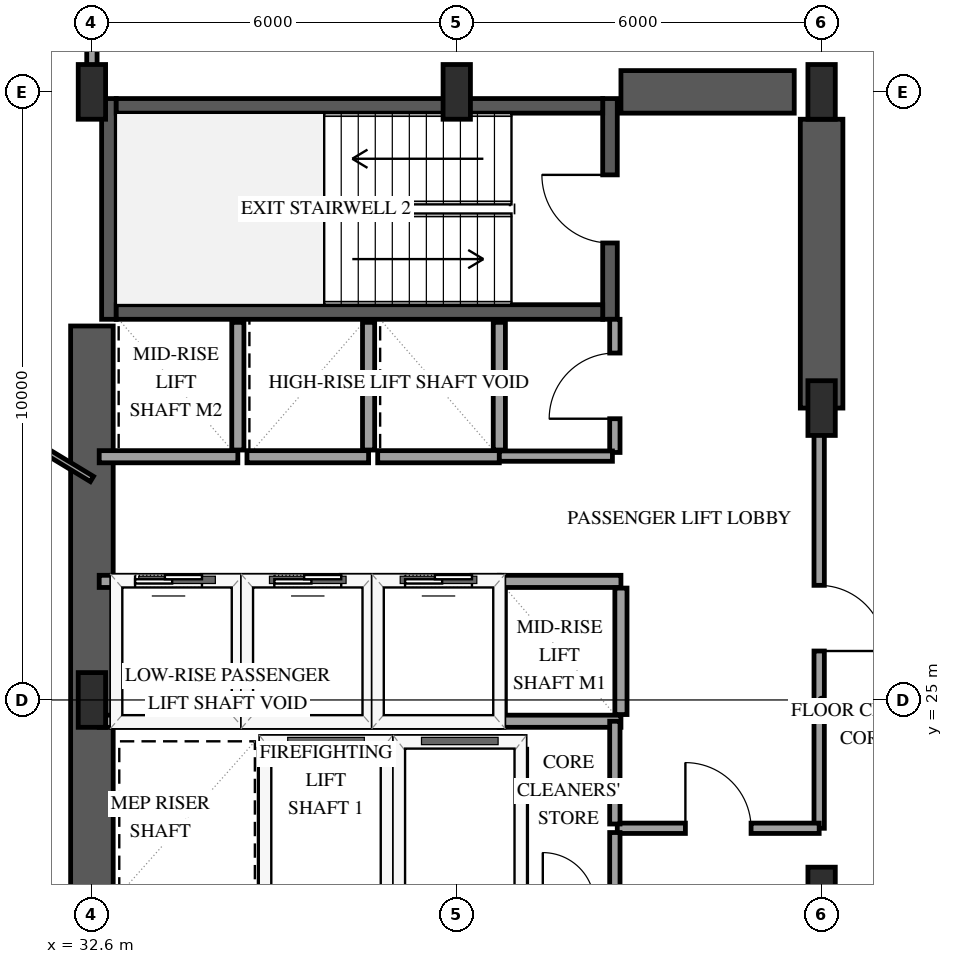
"""IFC4 building model, lengths in metres.
Left out: names, types, materials, properties, quantities, classifications, styles, units other than length and angle.
Written with IfcOpenShell. Run it as: python <this file> out.ifc"""

import sys

from ifc_helpers import new_model, si_unit, direction, frame, frame_2d, origin, origin_2d, place, context, subcontext, project, spatial, rectangle, extrude, element, fill, save


model = new_model("IFC4")
c1 = context("Model", 3, precision=1e-05, world=origin(), true_north=direction((0.0, 1.0)))
c2 = subcontext(c1, "Body", "Model", "MODEL_VIEW")
j1 = project(units=[si_unit("LENGTHUNIT", "METRE"), si_unit("PLANEANGLEUNIT", "RADIAN")], contexts=[c1])
p1 = place(None, origin())
s1 = spatial("IfcSite", under=j1, at=p1, CompositionType="ELEMENT")
p2 = place(p1, origin())
s2 = spatial("IfcBuilding", under=s1, at=p2, CompositionType="ELEMENT")
p3 = place(p2, frame((0.0, 0.0, 34.6)))
s3 = spatial("IfcBuildingStorey", under=s2, at=p3, CompositionType="ELEMENT", Elevation=34.6)
p4 = place(p3, frame((32.88, 31.26, 0.0), z_axis=(0.0, 0.0, 1.0), x_axis=(0.0, 1.0, 0.0)))
e1 = element("IfcWall", 1, at=p4, inside=s3, PredefinedType="SHEAR", context=c2, shape_type="SweptSolid", body=[
    extrude(rectangle(XDim=3.63, YDim=0.24, at=frame_2d((1.815, 0.0))), origin(), (0.0, 0.0, 1.0), 4.0),
])
p5 = place(p3, frame((41.12, 31.26, 0.0), z_axis=(0.0, 0.0, 1.0), x_axis=(0.0, 1.0, 0.0)))
e2 = element("IfcWall", 2, at=p5, inside=s3, PredefinedType="SHEAR", context=c2, shape_type="SweptSolid", body=[
    extrude(rectangle(XDim=3.63, YDim=0.24, at=frame_2d((1.815, 0.0))), origin(), (0.0, 0.0, 1.0), 4.0),
])
p6 = place(p5, frame((1.255, 0.0, 0.0)))
e3 = element("IfcOpeningElement", 3, at=p6, cuts=e2, PredefinedType="OPENING", context=c2, shape_type="SweptSolid", body=[
    extrude(rectangle(XDim=1.12, YDim=2.15, at=frame_2d((0.56, 1.075))), frame((0.0, 0.13, 0.0), z_axis=(0.0, -1.0, 0.0), x_axis=(1.0, 0.0, 0.0)), (0.0, 0.0, 1.0), 0.26),
])
for number, where, z_axis, x_axis in (
    (4, (33.0, 31.38, 0.0), (0.0, 0.0, 1.0), (1.0, 0.0, 0.0)),
    (5, (33.0, 34.77, 0.0), (0.0, 0.0, 1.0), (1.0, 0.0, 0.0)),
):
    element("IfcWall", number, at=place(p3, frame(where, z_axis=z_axis, x_axis=x_axis)), inside=s3, PredefinedType="SHEAR", context=c2, shape_type="SweptSolid", body=[
        extrude(rectangle(XDim=8.0, YDim=0.24, at=frame_2d((4.0, 0.0))), origin(), (0.0, 0.0, 1.0), 4.0),
    ])
p7 = place(p3, frame((32.6, 18.85, 0.0), z_axis=(0.0, 0.0, 1.0), x_axis=(0.0, 1.0, 0.0)))
e6 = element("IfcWall", 6, at=p7, inside=s3, PredefinedType="SHEAR", context=c2, shape_type="SweptSolid", body=[
    extrude(rectangle(XDim=12.3, YDim=0.7, at=frame_2d((6.15, 0.0))), origin(), (0.0, 0.0, 1.0), 4.0),
])
p8 = place(p3, frame((41.3, 35.0, 0.0), z_axis=(0.0, 0.0, 1.0), x_axis=(1.0, 0.0, 0.0)))
e7 = element("IfcWall", 7, at=p8, inside=s3, PredefinedType="SHEAR", context=c2, shape_type="SweptSolid", body=[
    extrude(rectangle(XDim=2.85, YDim=0.7, at=frame_2d((1.425, 0.0))), origin(), (0.0, 0.0, 1.0), 4.0),
])
p9 = place(p3, frame((44.6, 29.8, 0.0), z_axis=(0.0, 0.0, 1.0), x_axis=(0.0, 1.0, 0.0)))
e8 = element("IfcWall", 8, at=p9, inside=s3, PredefinedType="SHEAR", context=c2, shape_type="SweptSolid", body=[
    extrude(rectangle(XDim=4.75, YDim=0.7, at=frame_2d((2.375, 0.0))), origin(), (0.0, 0.0, 1.0), 4.0),
])
for number, where, z_axis, x_axis in (
    (9, (32.6, 25.0, 0.0), (0.0, 0.0, 1.0), (1.0, 0.0, 0.0)),
    (10, (32.6, 35.0, 0.0), (0.0, 0.0, 1.0), (1.0, 0.0, 0.0)),
    (11, (38.6, 35.0, 0.0), (0.0, 0.0, 1.0), (1.0, 0.0, 0.0)),
    (12, (44.6, 21.8, 0.0), (0.0, 0.0, 1.0), (1.0, 0.0, 0.0)),
    (13, (44.6, 29.8, 0.0), (0.0, 0.0, 1.0), (1.0, 0.0, 0.0)),
    (14, (44.6, 35.0, 0.0), (0.0, 0.0, 1.0), (1.0, 0.0, 0.0)),
):
    element("IfcColumn", number, at=place(p3, frame(where, z_axis=z_axis, x_axis=x_axis)), inside=s3, PredefinedType="PILASTER", context=c2, shape_type="SweptSolid", body=[
        extrude(rectangle(XDim=0.45, YDim=0.9, at=origin_2d()), origin(), (0.0, 0.0, 1.0), 4.0),
    ])
p10 = place(p3, frame((35.45, 24.3, 0.0), z_axis=(0.0, 0.0, 1.0), x_axis=(1.0, 0.0, 0.0)))
e15 = element("IfcWall", 15, at=p10, inside=s3, PredefinedType="SOLIDWALL", context=c2, shape_type="SweptSolid", body=[
    extrude(rectangle(XDim=2.0, YDim=0.2, at=frame_2d((1.0, 0.0))), origin(), (0.0, 0.0, 1.0), 3.7),
])
for number, where, z_axis, x_axis in (
    (16, (35.45, 21.81, 0.0), (0.0, 0.0, 1.0), (0.0, 1.0, 0.0)),
    (17, (37.45, 21.81, 0.0), (0.0, 0.0, 1.0), (0.0, 1.0, 0.0)),
):
    element("IfcWall", number, at=place(p3, frame(where, z_axis=z_axis, x_axis=x_axis)), inside=s3, PredefinedType="SOLIDWALL", context=c2, shape_type="SweptSolid", body=[
        extrude(rectangle(XDim=2.38, YDim=0.2, at=frame_2d((1.19, 0.0))), origin(), (0.0, 0.0, 1.0), 3.7),
    ])
p11 = place(p3, frame((37.65, 24.3, 0.0), z_axis=(0.0, 0.0, 1.0), x_axis=(1.0, 0.0, 0.0)))
e18 = element("IfcWall", 18, at=p11, inside=s3, PredefinedType="SOLIDWALL", context=c2, shape_type="SweptSolid", body=[
    extrude(rectangle(XDim=2.0, YDim=0.2, at=frame_2d((1.0, 0.0))), origin(), (0.0, 0.0, 1.0), 3.7),
])
p12 = place(p3, frame((39.65, 21.81, 0.0), z_axis=(0.0, 0.0, 1.0), x_axis=(0.0, 1.0, 0.0)))
e19 = element("IfcWall", 19, at=p12, inside=s3, PredefinedType="SOLIDWALL", context=c2, shape_type="SweptSolid", body=[
    extrude(rectangle(XDim=2.38, YDim=0.2, at=frame_2d((1.19, 0.0))), origin(), (0.0, 0.0, 1.0), 3.7),
])
p13 = place(p3, frame((32.72, 24.65, 0.0), z_axis=(0.0, 0.0, 1.0), x_axis=(1.0, 0.0, 0.0)))
e20 = element("IfcWall", 20, at=p13, inside=s3, PredefinedType="SOLIDWALL", context=c2, shape_type="SweptSolid", body=[
    extrude(rectangle(XDim=2.28, YDim=0.2, at=frame_2d((1.14, 0.0))), origin(), (0.0, 0.0, 1.0), 3.7),
])
p14 = place(p3, frame((32.72, 26.95, 0.0), z_axis=(0.0, 0.0, 1.0), x_axis=(1.0, 0.0, 0.0)))
e21 = element("IfcWall", 21, at=p14, inside=s3, PredefinedType="SOLIDWALL", context=c2, shape_type="SweptSolid", body=[
    extrude(rectangle(XDim=2.28, YDim=0.2, at=frame_2d((1.14, 0.0))), origin(), (0.0, 0.0, 1.0), 3.7),
])
p15 = place(p14, frame((0.59, 0.0, 0.0)))
e22 = element("IfcOpeningElement", 22, at=p15, cuts=e21, PredefinedType="OPENING", context=c2, shape_type="SweptSolid", body=[
    extrude(rectangle(XDim=1.1, YDim=2.15, at=frame_2d((0.55, 1.075))), frame((0.0, 0.11, 0.0), z_axis=(0.0, -1.0, 0.0), x_axis=(1.0, 0.0, 0.0)), (0.0, 0.0, 1.0), 0.22),
])
p16 = place(p3, frame((35.0, 24.76, 0.0), z_axis=(0.0, 0.0, 1.0), x_axis=(0.0, 1.0, 0.0)))
e23 = element("IfcWall", 23, at=p16, inside=s3, PredefinedType="SOLIDWALL", context=c2, shape_type="SweptSolid", body=[
    extrude(rectangle(XDim=2.08, YDim=0.2, at=frame_2d((1.04, 0.0))), origin(), (0.0, 0.0, 1.0), 3.7),
])
p17 = place(p3, frame((35.15, 24.65, 0.0), z_axis=(0.0, 0.0, 1.0), x_axis=(1.0, 0.0, 0.0)))
e24 = element("IfcWall", 24, at=p17, inside=s3, PredefinedType="SOLIDWALL", context=c2, shape_type="SweptSolid", body=[
    extrude(rectangle(XDim=2.0, YDim=0.2, at=frame_2d((1.0, 0.0))), origin(), (0.0, 0.0, 1.0), 3.7),
])
p18 = place(p3, frame((35.15, 26.95, 0.0), z_axis=(0.0, 0.0, 1.0), x_axis=(1.0, 0.0, 0.0)))
e25 = element("IfcWall", 25, at=p18, inside=s3, PredefinedType="SOLIDWALL", context=c2, shape_type="SweptSolid", body=[
    extrude(rectangle(XDim=2.0, YDim=0.2, at=frame_2d((1.0, 0.0))), origin(), (0.0, 0.0, 1.0), 3.7),
])
p19 = place(p18, frame((0.45, 0.0, 0.0)))
e26 = element("IfcOpeningElement", 26, at=p19, cuts=e25, PredefinedType="OPENING", context=c2, shape_type="SweptSolid", body=[
    extrude(rectangle(XDim=1.1, YDim=2.15, at=frame_2d((0.55, 1.075))), frame((0.0, 0.11, 0.0), z_axis=(0.0, -1.0, 0.0), x_axis=(1.0, 0.0, 0.0)), (0.0, 0.0, 1.0), 0.22),
])
p20 = place(p3, frame((37.15, 24.76, 0.0), z_axis=(0.0, 0.0, 1.0), x_axis=(0.0, 1.0, 0.0)))
e27 = element("IfcWall", 27, at=p20, inside=s3, PredefinedType="SOLIDWALL", context=c2, shape_type="SweptSolid", body=[
    extrude(rectangle(XDim=2.08, YDim=0.2, at=frame_2d((1.04, 0.0))), origin(), (0.0, 0.0, 1.0), 3.7),
])
p21 = place(p3, frame((37.3, 24.65, 0.0), z_axis=(0.0, 0.0, 1.0), x_axis=(1.0, 0.0, 0.0)))
e28 = element("IfcWall", 28, at=p21, inside=s3, PredefinedType="SOLIDWALL", context=c2, shape_type="SweptSolid", body=[
    extrude(rectangle(XDim=2.0, YDim=0.2, at=frame_2d((1.0, 0.0))), origin(), (0.0, 0.0, 1.0), 3.7),
])
p22 = place(p3, frame((37.3, 26.95, 0.0), z_axis=(0.0, 0.0, 1.0), x_axis=(1.0, 0.0, 0.0)))
e29 = element("IfcWall", 29, at=p22, inside=s3, PredefinedType="SOLIDWALL", context=c2, shape_type="SweptSolid", body=[
    extrude(rectangle(XDim=2.0, YDim=0.2, at=frame_2d((1.0, 0.0))), origin(), (0.0, 0.0, 1.0), 3.7),
])
p23 = place(p22, frame((0.45, 0.0, 0.0)))
e30 = element("IfcOpeningElement", 30, at=p23, cuts=e29, PredefinedType="OPENING", context=c2, shape_type="SweptSolid", body=[
    extrude(rectangle(XDim=1.1, YDim=2.15, at=frame_2d((0.55, 1.075))), frame((0.0, 0.11, 0.0), z_axis=(0.0, -1.0, 0.0), x_axis=(1.0, 0.0, 0.0)), (0.0, 0.0, 1.0), 0.22),
])
p24 = place(p3, frame((39.3, 24.76, 0.0), z_axis=(0.0, 0.0, 1.0), x_axis=(0.0, 1.0, 0.0)))
e31 = element("IfcWall", 31, at=p24, inside=s3, PredefinedType="SOLIDWALL", context=c2, shape_type="SweptSolid", body=[
    extrude(rectangle(XDim=2.08, YDim=0.2, at=frame_2d((1.04, 0.0))), origin(), (0.0, 0.0, 1.0), 3.7),
])
for number, where, z_axis, x_axis in (
    (32, (39.3, 24.65, 0.0), (0.0, 0.0, 1.0), (1.0, 0.0, 0.0)),
    (33, (39.3, 26.95, 0.0), (0.0, 0.0, 1.0), (1.0, 0.0, 0.0)),
):
    element("IfcWall", number, at=place(p3, frame(where, z_axis=z_axis, x_axis=x_axis)), inside=s3, PredefinedType="SOLIDWALL", context=c2, shape_type="SweptSolid", body=[
        extrude(rectangle(XDim=2.0, YDim=0.2, at=frame_2d((1.0, 0.0))), origin(), (0.0, 0.0, 1.0), 3.7),
    ])
p25 = place(p3, frame((41.3, 24.76, 0.0), z_axis=(0.0, 0.0, 1.0), x_axis=(0.0, 1.0, 0.0)))
e34 = element("IfcWall", 34, at=p25, inside=s3, PredefinedType="SOLIDWALL", context=c2, shape_type="SweptSolid", body=[
    extrude(rectangle(XDim=2.08, YDim=0.2, at=frame_2d((1.04, 0.0))), origin(), (0.0, 0.0, 1.0), 3.7),
])
p26 = place(p3, frame((32.72, 29.0, 0.0), z_axis=(0.0, 0.0, 1.0), x_axis=(1.0, 0.0, 0.0)))
e35 = element("IfcWall", 35, at=p26, inside=s3, PredefinedType="SOLIDWALL", context=c2, shape_type="SweptSolid", body=[
    extrude(rectangle(XDim=2.28, YDim=0.2, at=frame_2d((1.14, 0.0))), origin(), (0.0, 0.0, 1.0), 3.7),
])
p27 = place(p3, frame((35.0, 29.11, 0.0), z_axis=(0.0, 0.0, 1.0), x_axis=(0.0, 1.0, 0.0)))
e36 = element("IfcWall", 36, at=p27, inside=s3, PredefinedType="SOLIDWALL", context=c2, shape_type="SweptSolid", body=[
    extrude(rectangle(XDim=2.1, YDim=0.2, at=frame_2d((1.05, 0.0))), origin(), (0.0, 0.0, 1.0), 3.7),
])
p28 = place(p3, frame((35.15, 29.0, 0.0), z_axis=(0.0, 0.0, 1.0), x_axis=(1.0, 0.0, 0.0)))
e37 = element("IfcWall", 37, at=p28, inside=s3, PredefinedType="SOLIDWALL", context=c2, shape_type="SweptSolid", body=[
    extrude(rectangle(XDim=2.0, YDim=0.2, at=frame_2d((1.0, 0.0))), origin(), (0.0, 0.0, 1.0), 3.7),
])
p29 = place(p3, frame((37.15, 29.11, 0.0), z_axis=(0.0, 0.0, 1.0), x_axis=(0.0, 1.0, 0.0)))
e38 = element("IfcWall", 38, at=p29, inside=s3, PredefinedType="SOLIDWALL", context=c2, shape_type="SweptSolid", body=[
    extrude(rectangle(XDim=2.1, YDim=0.2, at=frame_2d((1.05, 0.0))), origin(), (0.0, 0.0, 1.0), 3.7),
])
p30 = place(p3, frame((37.3, 29.0, 0.0), z_axis=(0.0, 0.0, 1.0), x_axis=(1.0, 0.0, 0.0)))
e39 = element("IfcWall", 39, at=p30, inside=s3, PredefinedType="SOLIDWALL", context=c2, shape_type="SweptSolid", body=[
    extrude(rectangle(XDim=2.0, YDim=0.2, at=frame_2d((1.0, 0.0))), origin(), (0.0, 0.0, 1.0), 3.7),
])
p31 = place(p3, frame((39.3, 29.11, 0.0), z_axis=(0.0, 0.0, 1.0), x_axis=(0.0, 1.0, 0.0)))
e40 = element("IfcWall", 40, at=p31, inside=s3, PredefinedType="SOLIDWALL", context=c2, shape_type="SweptSolid", body=[
    extrude(rectangle(XDim=2.1, YDim=0.2, at=frame_2d((1.05, 0.0))), origin(), (0.0, 0.0, 1.0), 3.7),
])
p32 = place(p3, frame((32.6, 28.634, 0.0), z_axis=(0.0, 0.0, 1.0), x_axis=(-0.855377378264, 0.518005348191, 0.0)))
e41 = element("IfcWall", 41, at=p32, inside=s3, PredefinedType="PARTITIONING", context=c2, shape_type="SweptSolid", body=[
    extrude(rectangle(XDim=7.888, YDim=0.1, at=frame_2d((3.944, 0.0))), origin(), (0.0, 0.0, 1.0), 3.074),
])
p33 = place(p3, frame((44.56, 29.8, 0.0), z_axis=(0.0, 0.0, 1.0), x_axis=(0.0, -1.0, 0.0)))
e42 = element("IfcWall", 42, at=p33, inside=s3, PredefinedType="PARTITIONING", context=c2, shape_type="SweptSolid", body=[
    extrude(rectangle(XDim=6.91, YDim=0.17, at=frame_2d((3.455, 0.0))), origin(), (0.0, 0.0, 1.0), 2.74),
])
p34 = place(p33, frame((2.915, 0.0, 0.0)))
e43 = element("IfcOpeningElement", 43, at=p34, cuts=e42, PredefinedType="OPENING", context=c2, shape_type="SweptSolid", body=[
    extrude(rectangle(XDim=1.08, YDim=2.15, at=frame_2d((0.54, 1.075))), frame((0.0, 0.095, 0.0), z_axis=(0.0, -1.0, 0.0), x_axis=(1.0, 0.0, 0.0)), (0.0, 0.0, 1.0), 0.19),
])
p35 = place(p3, frame((41.24, 22.89, 0.0), z_axis=(0.0, 0.0, 1.0), x_axis=(1.0, 0.0, 0.0)))
e44 = element("IfcWall", 44, at=p35, inside=s3, PredefinedType="PARTITIONING", context=c2, shape_type="SweptSolid", body=[
    extrude(rectangle(XDim=3.32, YDim=0.17, at=frame_2d((1.66, 0.0))), origin(), (0.0, 0.0, 1.0), 3.7),
])
p36 = place(p35, frame((1.12, 0.0, 0.0)))
e45 = element("IfcOpeningElement", 45, at=p36, cuts=e44, PredefinedType="OPENING", context=c2, shape_type="SweptSolid", body=[
    extrude(rectangle(XDim=1.08, YDim=2.15, at=frame_2d((0.54, 1.075))), frame((0.0, 0.095, 0.0), z_axis=(0.0, -1.0, 0.0), x_axis=(1.0, 0.0, 0.0)), (0.0, 0.0, 1.0), 0.19),
])
p37 = place(p3, frame((41.2, 29.07, 0.0), z_axis=(0.0, 0.0, 1.0), x_axis=(0.0, 1.0, 0.0)))
e46 = element("IfcWall", 46, at=p37, inside=s3, PredefinedType="PARTITIONING", context=c2, shape_type="SweptSolid", body=[
    extrude(rectangle(XDim=2.19, YDim=0.17, at=frame_2d((1.095, 0.0))), origin(), (0.0, 0.0, 1.0), 3.7),
])
p38 = place(p37, frame((0.555, 0.0, 0.0)))
e47 = element("IfcOpeningElement", 47, at=p38, cuts=e46, PredefinedType="OPENING", context=c2, shape_type="SweptSolid", body=[
    extrude(rectangle(XDim=1.08, YDim=2.15, at=frame_2d((0.54, 1.075))), frame((0.0, 0.095, 0.0), z_axis=(0.0, -1.0, 0.0), x_axis=(1.0, 0.0, 0.0)), (0.0, 0.0, 1.0), 0.19),
])
p39 = place(p3, frame((32.6, 35.07, 0.0), z_axis=(0.0, 0.0, 1.0), x_axis=(0.0, 1.0, 0.0)))
e48 = element("IfcWall", 48, at=p39, inside=s3, PredefinedType="PARTITIONING", context=c2, shape_type="SweptSolid", body=[
    extrude(rectangle(XDim=1.91, YDim=0.17, at=frame_2d((0.955, 0.0))), origin(), (0.0, 0.0, 1.0), 3.7),
])
p40 = place(p3, frame((39.3, 29.01, 0.0), z_axis=(0.0, 0.0, 1.0), x_axis=(1.0, 0.0, 0.0)))
e49 = element("IfcWall", 49, at=p40, inside=s3, PredefinedType="PARTITIONING", context=c2, shape_type="SweptSolid", body=[
    extrude(rectangle(XDim=1.86, YDim=0.17, at=frame_2d((0.93, 0.0))), origin(), (0.0, 0.0, 1.0), 3.7),
])
p41 = place(p3, frame((41.2, 22.96, 0.0), z_axis=(0.0, 0.0, 1.0), x_axis=(0.0, 1.0, 0.0)))
e50 = element("IfcWall", 50, at=p41, inside=s3, PredefinedType="PARTITIONING", context=c2, shape_type="SweptSolid", body=[
    extrude(rectangle(XDim=1.69, YDim=0.17, at=frame_2d((0.845, 0.0))), origin(), (0.0, 0.0, 1.0), 3.7),
])
p42 = place(p3, frame((41.2, 21.7, 0.0), z_axis=(0.0, 0.0, 1.0), x_axis=(0.0, 1.0, 0.0)))
e51 = element("IfcWall", 51, at=p42, inside=s3, PredefinedType="PARTITIONING", context=c2, shape_type="SweptSolid", body=[
    extrude(rectangle(XDim=1.12, YDim=0.17, at=frame_2d((0.56, 0.0))), origin(), (0.0, 0.0, 1.0), 3.7),
])
p43 = place(p15, origin())
e52 = element("IfcDoor", 52, at=p43, inside=s3, OperationType="SLIDING_TO_LEFT", PredefinedType="DOOR", context=c2, shape_type="SweptSolid", body=[
    extrude(rectangle(XDim=1.1, YDim=2.15, at=frame_2d((0.55, 1.075))), frame((0.0, 0.025, 0.0), z_axis=(0.0, -1.0, 0.0), x_axis=(1.0, 0.0, 0.0)), (0.0, 0.0, 1.0), 0.05),
])
fill(e22, e52)
p44 = place(p19, origin())
e53 = element("IfcDoor", 53, at=p44, inside=s3, OperationType="SLIDING_TO_LEFT", PredefinedType="DOOR", context=c2, shape_type="SweptSolid", body=[
    extrude(rectangle(XDim=1.1, YDim=2.15, at=frame_2d((0.55, 1.075))), frame((0.0, 0.025, 0.0), z_axis=(0.0, -1.0, 0.0), x_axis=(1.0, 0.0, 0.0)), (0.0, 0.0, 1.0), 0.05),
])
fill(e26, e53)
p45 = place(p23, origin())
e54 = element("IfcDoor", 54, at=p45, inside=s3, OperationType="SLIDING_TO_LEFT", PredefinedType="DOOR", context=c2, shape_type="SweptSolid", body=[
    extrude(rectangle(XDim=1.1, YDim=2.15, at=frame_2d((0.55, 1.075))), frame((0.0, 0.025, 0.0), z_axis=(0.0, -1.0, 0.0), x_axis=(1.0, 0.0, 0.0)), (0.0, 0.0, 1.0), 0.05),
])
fill(e30, e54)
p46 = place(p6, origin())
e55 = element("IfcDoor", 55, at=p46, inside=s3, OperationType="SINGLE_SWING_RIGHT", PredefinedType="DOOR", context=c2, shape_type="SweptSolid", body=[
    extrude(rectangle(XDim=1.12, YDim=2.15, at=frame_2d((0.56, 1.075))), frame((0.0, 0.025, 0.0), z_axis=(0.0, -1.0, 0.0), x_axis=(1.0, 0.0, 0.0)), (0.0, 0.0, 1.0), 0.05),
])
fill(e3, e55)
p47 = place(p34, origin())
e56 = element("IfcDoor", 56, at=p47, inside=s3, OperationType="SINGLE_SWING_RIGHT", PredefinedType="DOOR", context=c2, shape_type="SweptSolid", body=[
    extrude(rectangle(XDim=1.08, YDim=2.15, at=frame_2d((0.54, 1.075))), frame((0.0, 0.025, 0.0), z_axis=(0.0, -1.0, 0.0), x_axis=(1.0, 0.0, 0.0)), (0.0, 0.0, 1.0), 0.05),
])
fill(e43, e56)
p48 = place(p36, origin())
e57 = element("IfcDoor", 57, at=p48, inside=s3, OperationType="SINGLE_SWING_LEFT", PredefinedType="DOOR", context=c2, shape_type="SweptSolid", body=[
    extrude(rectangle(XDim=1.08, YDim=2.15, at=frame_2d((0.54, 1.075))), frame((0.0, 0.025, 0.0), z_axis=(0.0, -1.0, 0.0), x_axis=(1.0, 0.0, 0.0)), (0.0, 0.0, 1.0), 0.05),
])
fill(e45, e57)
p49 = place(p38, origin())
e58 = element("IfcDoor", 58, at=p49, inside=s3, OperationType="SINGLE_SWING_LEFT", PredefinedType="DOOR", context=c2, shape_type="SweptSolid", body=[
    extrude(rectangle(XDim=1.08, YDim=2.15, at=frame_2d((0.54, 1.075))), frame((0.0, 0.025, 0.0), z_axis=(0.0, -1.0, 0.0), x_axis=(1.0, 0.0, 0.0)), (0.0, 0.0, 1.0), 0.05),
])
fill(e47, e58)
save(model, sys.argv[1])
